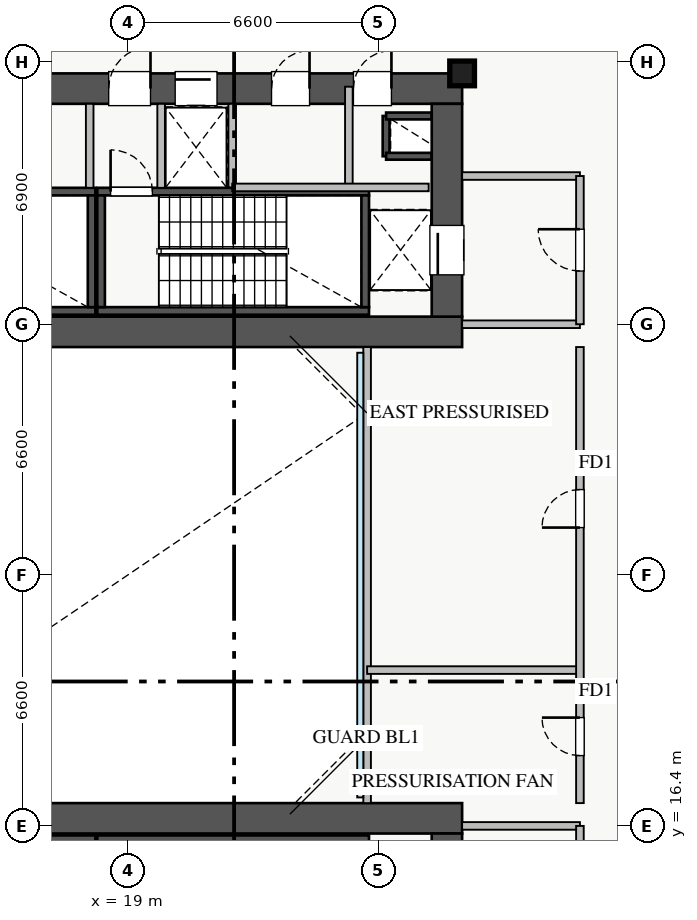
"""IFC4 building model, lengths in metres.
Left out: names, types, materials, properties, quantities, classifications, styles, units other than length and angle.
Written with IfcOpenShell. Run it as: python <this file> out.ifc"""

import sys

from ifc_helpers import new_model, si_unit, direction, frame, frame_2d, origin, origin_2d, place, context, subcontext, project, spatial, rectangle, extrude, source, transform, mapped, element, fill, save


model = new_model("IFC4")
c1 = context("Model", 3, precision=1e-05, world=origin(), true_north=direction((0.0, 1.0)))
c2 = subcontext(c1, "Body", "Model", "MODEL_VIEW")
j1 = project(units=[si_unit("LENGTHUNIT", "METRE"), si_unit("PLANEANGLEUNIT", "RADIAN")], contexts=[c1])
p1 = place(None, origin())
s1 = spatial("IfcSite", under=j1, at=p1, CompositionType="ELEMENT")
p2 = place(p1, origin())
s2 = spatial("IfcBuilding", under=s1, at=p2, CompositionType="ELEMENT")
p3 = place(p2, frame((0.0, 0.0, 45.75)))
s3 = spatial("IfcBuildingStorey", under=s2, at=p3, CompositionType="ELEMENT", Elevation=45.75)
p4 = place(p3, frame((25.8, 34.02, 0.0), z_axis=(0.0, 0.0, 1.0), x_axis=(0.0, 1.0, 0.0)))
e1 = element("IfcWall", 1, at=p4, inside=s3, PredefinedType="SHEAR", context=c2, shape_type="SweptSolid", body=[
    extrude(rectangle(XDim=1.06, YDim=0.18, at=frame_2d((0.53, 0.0))), origin(), (0.0, 0.0, 1.0), 4.32),
])
for number, where, z_axis, x_axis in (
    (2, (25.8, 35.08, 0.0), (0.0, 0.0, 1.0), (1.0, 0.0, 0.0)),
    (3, (25.8, 34.02, 0.0), (0.0, 0.0, 1.0), (1.0, 0.0, 0.0)),
):
    element("IfcWall", number, at=place(p3, frame(where, z_axis=z_axis, x_axis=x_axis)), inside=s3, PredefinedType="SHEAR", context=c2, shape_type="SweptSolid", body=[
        extrude(rectangle(XDim=1.2, YDim=0.18, at=frame_2d((0.6, 0.0))), origin(), (0.0, 0.0, 1.0), 4.32),
    ])
p5 = place(p3, frame((19.88, 33.2, 0.0), z_axis=(0.0, 0.0, 1.0), x_axis=(1.0, 0.0, 0.0)))
e4 = element("IfcWall", 4, at=p5, inside=s3, PredefinedType="SHEAR", context=c2, shape_type="SweptSolid", body=[
    extrude(rectangle(XDim=1.87, YDim=0.18, at=frame_2d((0.935, 0.0))), origin(), (0.0, 0.0, 1.0), 4.32),
])
p6 = place(p3, frame((11.0, 29.95, 0.0), z_axis=(0.0, 0.0, 1.0), x_axis=(1.0, 0.0, 0.0)))
e5 = element("IfcWall", 5, at=p6, inside=s3, PredefinedType="SHEAR", context=c2, shape_type="SweptSolid", body=[
    extrude(rectangle(XDim=7.15, YDim=0.2, at=frame_2d((3.575, 0.0))), origin(), (0.0, 0.0, 1.0), 4.5),
])
p7 = place(p3, frame((11.0, 33.09, 0.0), z_axis=(0.0, 0.0, 1.0), x_axis=(1.0, 0.0, 0.0)))
e6 = element("IfcWall", 6, at=p7, inside=s3, PredefinedType="SHEAR", context=c2, shape_type="SweptSolid", body=[
    extrude(rectangle(XDim=7.15, YDim=0.2, at=frame_2d((3.575, 0.0))), origin(), (0.0, 0.0, 1.0), 4.5),
])
p8 = place(p7, frame((0.35, 0.0, 0.0)))
e7 = element("IfcOpeningElement", 7, at=p8, cuts=e6, PredefinedType="OPENING", context=c2, shape_type="SweptSolid", body=[
    extrude(rectangle(XDim=1.1, YDim=2.05, at=frame_2d((0.55, 1.025))), frame((0.0, 0.11, 0.0), z_axis=(0.0, -1.0, 0.0), x_axis=(1.0, 0.0, 0.0)), (0.0, 0.0, 1.0), 0.22),
])
p9 = place(p3, frame((18.05, 30.05, 0.0), z_axis=(0.0, 0.0, 1.0), x_axis=(0.0, 1.0, 0.0)))
e8 = element("IfcWall", 8, at=p9, inside=s3, PredefinedType="SHEAR", context=c2, shape_type="SweptSolid", body=[
    extrude(rectangle(XDim=2.94, YDim=0.2, at=frame_2d((1.47, 0.0))), origin(), (0.0, 0.0, 1.0), 4.5),
])
p10 = place(p3, frame((18.2, 29.95, 0.0), z_axis=(0.0, 0.0, 1.0), x_axis=(1.0, 0.0, 0.0)))
e9 = element("IfcWall", 9, at=p10, inside=s3, PredefinedType="SHEAR", context=c2, shape_type="SweptSolid", body=[
    extrude(rectangle(XDim=7.15, YDim=0.2, at=frame_2d((3.575, 0.0))), origin(), (0.0, 0.0, 1.0), 4.5),
])
p11 = place(p3, frame((18.2, 33.09, 0.0), z_axis=(0.0, 0.0, 1.0), x_axis=(1.0, 0.0, 0.0)))
e10 = element("IfcWall", 10, at=p11, inside=s3, PredefinedType="SHEAR", context=c2, shape_type="SweptSolid", body=[
    extrude(rectangle(XDim=7.15, YDim=0.2, at=frame_2d((3.575, 0.0))), origin(), (0.0, 0.0, 1.0), 4.5),
])
p12 = place(p11, frame((0.35, 0.0, 0.0)))
e11 = element("IfcOpeningElement", 11, at=p12, cuts=e10, PredefinedType="OPENING", context=c2, shape_type="SweptSolid", body=[
    extrude(rectangle(XDim=1.1, YDim=2.05, at=frame_2d((0.55, 1.025))), frame((0.0, 0.11, 0.0), z_axis=(0.0, -1.0, 0.0), x_axis=(1.0, 0.0, 0.0)), (0.0, 0.0, 1.0), 0.22),
])
for number, where, z_axis, x_axis in (
    (12, (18.3, 30.05, 0.0), (0.0, 0.0, 1.0), (0.0, 1.0, 0.0)),
    (13, (25.25, 30.05, 0.0), (0.0, 0.0, 1.0), (0.0, 1.0, 0.0)),
):
    element("IfcWall", number, at=place(p3, frame(where, z_axis=z_axis, x_axis=x_axis)), inside=s3, PredefinedType="SHEAR", context=c2, shape_type="SweptSolid", body=[
        extrude(rectangle(XDim=2.94, YDim=0.2, at=frame_2d((1.47, 0.0))), origin(), (0.0, 0.0, 1.0), 4.5),
    ])
p13 = place(p3, frame((11.0, 16.05, 0.0), z_axis=(0.0, 0.0, 1.0), x_axis=(1.0, 0.0, 0.0)))
e14 = element("IfcWall", 14, at=p13, inside=s3, PredefinedType="SHEAR", context=c2, shape_type="SweptSolid", body=[
    extrude(rectangle(XDim=7.15, YDim=0.2, at=frame_2d((3.575, 0.0))), origin(), (0.0, 0.0, 1.0), 4.5),
])
p14 = place(p3, frame((18.2, 16.05, 0.0), z_axis=(0.0, 0.0, 1.0), x_axis=(1.0, 0.0, 0.0)))
e15 = element("IfcWall", 15, at=p14, inside=s3, PredefinedType="SHEAR", context=c2, shape_type="SweptSolid", body=[
    extrude(rectangle(XDim=7.15, YDim=0.2, at=frame_2d((3.575, 0.0))), origin(), (0.0, 0.0, 1.0), 4.5),
])
p15 = place(p3, frame((10.2, 29.4, 0.0), z_axis=(0.0, 0.0, 1.0), x_axis=(1.0, 0.0, 0.0)))
e16 = element("IfcWall", 16, at=p15, inside=s3, PredefinedType="SHEAR", context=c2, shape_type="SweptSolid", body=[
    extrude(rectangle(XDim=17.6, YDim=0.8, at=frame_2d((8.8, 0.0))), origin(), (0.0, 0.0, 1.0), 4.5),
])
p16 = place(p3, frame((10.2, 35.8, 0.0), z_axis=(0.0, 0.0, 1.0), x_axis=(1.0, 0.0, 0.0)))
e17 = element("IfcWall", 17, at=p16, inside=s3, PredefinedType="SHEAR", context=c2, shape_type="SweptSolid", body=[
    extrude(rectangle(XDim=17.6, YDim=0.8, at=frame_2d((8.8, 0.0))), origin(), (0.0, 0.0, 1.0), 4.5),
])
p17 = place(p16, frame((1.15, 0.0, 0.0)))
e18 = element("IfcOpeningElement", 18, at=p17, cuts=e17, PredefinedType="OPENING", context=c2, shape_type="SweptSolid", body=[
    extrude(rectangle(XDim=1.1, YDim=2.05, at=frame_2d((0.55, 1.025))), frame((0.0, 0.41, 0.0), z_axis=(0.0, -1.0, 0.0), x_axis=(1.0, 0.0, 0.0)), (0.0, 0.0, 1.0), 0.82),
])
p18 = place(p16, frame((8.3, 0.0, 0.0)))
e19 = element("IfcOpeningElement", 19, at=p18, cuts=e17, PredefinedType="OPENING", context=c2, shape_type="SweptSolid", body=[
    extrude(rectangle(XDim=1.1, YDim=2.05, at=frame_2d((0.55, 1.025))), frame((0.0, 0.41, 0.0), z_axis=(0.0, -1.0, 0.0), x_axis=(1.0, 0.0, 0.0)), (0.0, 0.0, 1.0), 0.82),
])
p19 = place(p16, frame((10.05, 0.0, 0.0)))
e20 = element("IfcOpeningElement", 20, at=p19, cuts=e17, PredefinedType="OPENING", context=c2, shape_type="SweptSolid", body=[
    extrude(rectangle(XDim=1.1, YDim=2.05, at=frame_2d((0.55, 1.025))), frame((0.0, 0.41, 0.0), z_axis=(0.0, -1.0, 0.0), x_axis=(1.0, 0.0, 0.0)), (0.0, 0.0, 1.0), 0.82),
])
p20 = place(p16, frame((4.9, 0.0, 0.0)))
e21 = element("IfcOpeningElement", 21, at=p20, cuts=e17, PredefinedType="OPENING", context=c2, shape_type="SweptSolid", body=[
    extrude(rectangle(XDim=1.1, YDim=2.05, at=frame_2d((0.55, 1.025))), frame((0.0, 0.41, 0.0), z_axis=(0.0, -1.0, 0.0), x_axis=(1.0, 0.0, 0.0)), (0.0, 0.0, 1.0), 0.82),
])
p21 = place(p16, frame((14.74, 0.0, 0.0)))
e22 = element("IfcOpeningElement", 22, at=p21, cuts=e17, PredefinedType="OPENING", context=c2, shape_type="SweptSolid", body=[
    extrude(rectangle(XDim=1.0, YDim=2.05, at=frame_2d((0.5, 1.025))), frame((0.0, 0.41, 0.0), z_axis=(0.0, -1.0, 0.0), x_axis=(1.0, 0.0, 0.0)), (0.0, 0.0, 1.0), 0.82),
])
p22 = place(p16, frame((12.585, 0.0, 0.0)))
e23 = element("IfcOpeningElement", 23, at=p22, cuts=e17, PredefinedType="OPENING", context=c2, shape_type="SweptSolid", body=[
    extrude(rectangle(XDim=1.0, YDim=2.05, at=frame_2d((0.5, 1.025))), frame((0.0, 0.41, 0.0), z_axis=(0.0, -1.0, 0.0), x_axis=(1.0, 0.0, 0.0)), (0.0, 0.0, 1.0), 0.82),
])
p23 = place(p3, frame((27.4, 29.8, 0.0), z_axis=(0.0, 0.0, 1.0), x_axis=(0.0, 1.0, 0.0)))
e24 = element("IfcWall", 24, at=p23, inside=s3, PredefinedType="SHEAR", context=c2, shape_type="SweptSolid", body=[
    extrude(rectangle(XDim=5.6, YDim=0.8, at=frame_2d((2.8, 0.0))), origin(), (0.0, 0.0, 1.0), 4.5),
])
p24 = place(p23, frame((1.1, 0.0, 0.0)))
e25 = element("IfcOpeningElement", 25, at=p24, cuts=e24, PredefinedType="OPENING", context=c2, shape_type="SweptSolid", body=[
    extrude(rectangle(XDim=1.3, YDim=2.05, at=frame_2d((0.65, 1.025))), frame((0.0, 0.41, 0.0), z_axis=(0.0, -1.0, 0.0), x_axis=(1.0, 0.0, 0.0)), (0.0, 0.0, 1.0), 0.82),
])
p25 = place(p3, frame((10.2, 16.6, 0.0), z_axis=(0.0, 0.0, 1.0), x_axis=(1.0, 0.0, 0.0)))
e26 = element("IfcWall", 26, at=p25, inside=s3, PredefinedType="SHEAR", context=c2, shape_type="SweptSolid", body=[
    extrude(rectangle(XDim=17.6, YDim=0.8, at=frame_2d((8.8, 0.0))), origin(), (0.0, 0.0, 1.0), 4.5),
])
p26 = place(p3, frame((27.4, 10.6, 0.0), z_axis=(0.0, 0.0, 1.0), x_axis=(0.0, 1.0, 0.0)))
e27 = element("IfcWall", 27, at=p26, inside=s3, PredefinedType="SHEAR", context=c2, shape_type="SweptSolid", body=[
    extrude(rectangle(XDim=5.6, YDim=0.8, at=frame_2d((2.8, 0.0))), origin(), (0.0, 0.0, 1.0), 4.5),
])
p27 = place(p26, frame((2.1, 0.0, 0.0)))
e28 = element("IfcOpeningElement", 28, at=p27, cuts=e27, PredefinedType="OPENING", context=c2, shape_type="SweptSolid", body=[
    extrude(rectangle(XDim=1.3, YDim=2.05, at=frame_2d((0.65, 1.025))), frame((0.0, 0.41, 0.0), z_axis=(0.0, -1.0, 0.0), x_axis=(1.0, 0.0, 0.0)), (0.0, 0.0, 1.0), 0.82),
])
m1 = source(origin(), c2, "Body", "SweptSolid", [
    extrude(rectangle(XDim=0.65, YDim=0.65, at=origin_2d()), origin(), (0.0, 0.0, 1.0), 4.5),
])
p28 = place(p3, frame((27.8, 36.2, 0.0), z_axis=(0.0, 0.0, 1.0), x_axis=(1.0, 0.0, 0.0)))
e29 = element("IfcColumn", 29, at=p28, inside=s3, PredefinedType="PILASTER", context=c2, shape_type="MappedRepresentation", body=[
    mapped(m1, transform((0.0, 0.0, 0.0), x_axis=(1.0, 0.0, 0.0), y_axis=(0.0, 1.0, 0.0), z_axis=(0.0, 0.0, 1.0), scale=1.0)),
])
p29 = place(p3, frame((27.8, 29.6, 0.0), z_axis=(0.0, 0.0, 1.0), x_axis=(1.0, 0.0, 0.0)))
e30 = element("IfcWall", 30, at=p29, inside=s3, PredefinedType="PARTITIONING", context=c2, shape_type="SweptSolid", body=[
    extrude(rectangle(XDim=3.1, YDim=0.2, at=frame_2d((1.55, 0.0))), origin(), (0.0, 0.0, 1.0), 4.32),
])
p30 = place(p3, frame((27.8, 33.5, 0.0), z_axis=(0.0, 0.0, 1.0), x_axis=(1.0, 0.0, 0.0)))
e31 = element("IfcWall", 31, at=p30, inside=s3, PredefinedType="PARTITIONING", context=c2, shape_type="SweptSolid", body=[
    extrude(rectangle(XDim=3.1, YDim=0.2, at=frame_2d((1.55, 0.0))), origin(), (0.0, 0.0, 1.0), 3.315),
])
p31 = place(p3, frame((30.9, 29.6, 0.0), z_axis=(0.0, 0.0, 1.0), x_axis=(0.0, 1.0, 0.0)))
e32 = element("IfcWall", 32, at=p31, inside=s3, PredefinedType="PARTITIONING", context=c2, shape_type="SweptSolid", body=[
    extrude(rectangle(XDim=3.9, YDim=0.2, at=frame_2d((1.95, 0.0))), origin(), (0.0, 0.0, 1.0), 4.32),
])
p32 = place(p31, frame((1.4, 0.0, 0.0)))
e33 = element("IfcOpeningElement", 33, at=p32, cuts=e32, PredefinedType="OPENING", context=c2, shape_type="SweptSolid", body=[
    extrude(rectangle(XDim=1.1, YDim=2.05, at=frame_2d((0.55, 1.025))), frame((0.0, 0.11, 0.0), z_axis=(0.0, -1.0, 0.0), x_axis=(1.0, 0.0, 0.0)), (0.0, 0.0, 1.0), 0.22),
])
p33 = place(p3, frame((27.8, 16.4, 0.0), z_axis=(0.0, 0.0, 1.0), x_axis=(1.0, 0.0, 0.0)))
e34 = element("IfcWall", 34, at=p33, inside=s3, PredefinedType="PARTITIONING", context=c2, shape_type="SweptSolid", body=[
    extrude(rectangle(XDim=3.1, YDim=0.2, at=frame_2d((1.55, 0.0))), origin(), (0.0, 0.0, 1.0), 4.32),
])
p34 = place(p3, frame((30.9, 12.5, 0.0), z_axis=(0.0, 0.0, 1.0), x_axis=(0.0, 1.0, 0.0)))
e35 = element("IfcWall", 35, at=p34, inside=s3, PredefinedType="PARTITIONING", context=c2, shape_type="SweptSolid", body=[
    extrude(rectangle(XDim=3.9, YDim=0.2, at=frame_2d((1.95, 0.0))), origin(), (0.0, 0.0, 1.0), 4.32),
])
p35 = place(p34, frame((1.4, 0.0, 0.0)))
e36 = element("IfcOpeningElement", 36, at=p35, cuts=e35, PredefinedType="OPENING", context=c2, shape_type="SweptSolid", body=[
    extrude(rectangle(XDim=1.1, YDim=2.05, at=frame_2d((0.55, 1.025))), frame((0.0, 0.11, 0.0), z_axis=(0.0, -1.0, 0.0), x_axis=(1.0, 0.0, 0.0)), (0.0, 0.0, 1.0), 0.22),
])
for number, where, z_axis, x_axis in (
    (37, (18.0, 33.19, 0.0), (0.0, 0.0, 1.0), (0.0, 1.0, 0.0)),
    (38, (19.88, 33.19, 0.0), (0.0, 0.0, 1.0), (0.0, 1.0, 0.0)),
):
    element("IfcWall", number, at=place(p3, frame(where, z_axis=z_axis, x_axis=x_axis)), inside=s3, PredefinedType="PARTITIONING", context=c2, shape_type="SweptSolid", body=[
        extrude(rectangle(XDim=2.21, YDim=0.2, at=frame_2d((1.105, 0.0))), origin(), (0.0, 0.0, 1.0), 4.32),
    ])
p36 = place(p3, frame((24.82, 33.2, 0.0), z_axis=(0.0, 0.0, 1.0), x_axis=(0.0, 1.0, 0.0)))
e39 = element("IfcWall", 39, at=p36, inside=s3, PredefinedType="PARTITIONING", context=c2, shape_type="SweptSolid", body=[
    extrude(rectangle(XDim=2.65, YDim=0.2, at=frame_2d((1.325, 0.0))), origin(), (0.0, 0.0, 1.0), 4.32),
])
p37 = place(p3, frame((21.75, 33.2, 0.0), z_axis=(0.0, 0.0, 1.0), x_axis=(0.0, 1.0, 0.0)))
e40 = element("IfcWall", 40, at=p37, inside=s3, PredefinedType="PARTITIONING", context=c2, shape_type="SweptSolid", body=[
    extrude(rectangle(XDim=2.2, YDim=0.2, at=frame_2d((1.1, 0.0))), origin(), (0.0, 0.0, 1.0), 4.32),
])
p38 = place(p3, frame((21.75, 33.2, 0.0), z_axis=(0.0, 0.0, 1.0), x_axis=(1.0, 0.0, 0.0)))
e41 = element("IfcWall", 41, at=p38, inside=s3, PredefinedType="PARTITIONING", context=c2, shape_type="SweptSolid", body=[
    extrude(rectangle(XDim=5.17, YDim=0.2, at=frame_2d((2.585, 0.0))), origin(), (0.0, 0.0, 1.0), 4.32),
])
p39 = place(p3, frame((25.3, 17.0, 0.0), z_axis=(0.0, 0.0, 1.0), x_axis=(0.0, 1.0, 0.0)))
e42 = element("IfcWall", 42, at=p39, inside=s3, PredefinedType="PARTITIONING", context=c2, shape_type="SweptSolid", body=[
    extrude(rectangle(XDim=12.0, YDim=0.2, at=frame_2d((6.0, 0.0))), origin(), (0.0, 0.0, 1.0), 3.815),
])
p40 = place(p3, frame((25.3, 20.5, 0.0), z_axis=(0.0, 0.0, 1.0), x_axis=(1.0, 0.0, 0.0)))
e43 = element("IfcWall", 43, at=p40, inside=s3, PredefinedType="PARTITIONING", context=c2, shape_type="SweptSolid", body=[
    extrude(rectangle(XDim=5.6, YDim=0.2, at=frame_2d((2.8, 0.0))), origin(), (0.0, 0.0, 1.0), 4.32),
])
p41 = place(p3, frame((30.9, 17.0, 0.0), z_axis=(0.0, 0.0, 1.0), x_axis=(0.0, 1.0, 0.0)))
e44 = element("IfcWall", 44, at=p41, inside=s3, PredefinedType="PARTITIONING", context=c2, shape_type="SweptSolid", body=[
    extrude(rectangle(XDim=12.0, YDim=0.2, at=frame_2d((6.0, 0.0))), origin(), (0.0, 0.0, 1.0), 4.32),
])
p42 = place(p41, frame((1.25, 0.0, 0.0)))
e45 = element("IfcOpeningElement", 45, at=p42, cuts=e44, PredefinedType="OPENING", context=c2, shape_type="SweptSolid", body=[
    extrude(rectangle(XDim=1.0, YDim=2.05, at=frame_2d((0.5, 1.025))), frame((0.0, 0.11, 0.0), z_axis=(0.0, -1.0, 0.0), x_axis=(1.0, 0.0, 0.0)), (0.0, 0.0, 1.0), 0.22),
])
p43 = place(p41, frame((7.25, 0.0, 0.0)))
e46 = element("IfcOpeningElement", 46, at=p43, cuts=e44, PredefinedType="OPENING", context=c2, shape_type="SweptSolid", body=[
    extrude(rectangle(XDim=1.0, YDim=2.05, at=frame_2d((0.5, 1.025))), frame((0.0, 0.11, 0.0), z_axis=(0.0, -1.0, 0.0), x_axis=(1.0, 0.0, 0.0)), (0.0, 0.0, 1.0), 0.22),
])
m2 = source(origin(), c2, "Body", "SweptSolid", [
    extrude(rectangle(XDim=1.3, YDim=2.05, at=frame_2d((0.65, 1.025))), frame((0.0, 0.025, 0.0), z_axis=(0.0, -1.0, 0.0), x_axis=(1.0, 0.0, 0.0)), (0.0, 0.0, 1.0), 0.05),
])
p44 = place(p24, origin())
e47 = element("IfcDoor", 47, at=p44, inside=s3, OperationType="SLIDING_TO_LEFT", PredefinedType="DOOR", context=c2, shape_type="MappedRepresentation", body=[
    mapped(m2, transform((0.0, 0.0, 0.0), x_axis=(1.0, 0.0, 0.0), y_axis=(0.0, 1.0, 0.0), z_axis=(0.0, 0.0, 1.0), scale=1.0)),
])
fill(e25, e47)
m3 = source(origin(), c2, "Body", "SweptSolid", [
    extrude(rectangle(XDim=1.1, YDim=2.05, at=frame_2d((0.55, 1.025))), frame((0.0, 0.025, 0.0), z_axis=(0.0, -1.0, 0.0), x_axis=(1.0, 0.0, 0.0)), (0.0, 0.0, 1.0), 0.05),
])
p45 = place(p18, origin())
e48 = element("IfcDoor", 48, at=p45, inside=s3, OperationType="SINGLE_SWING_RIGHT", PredefinedType="DOOR", context=c2, shape_type="MappedRepresentation", body=[
    mapped(m3, transform((0.0, 0.0, 0.0), x_axis=(1.0, 0.0, 0.0), y_axis=(0.0, 1.0, 0.0), z_axis=(0.0, 0.0, 1.0), scale=1.0)),
])
fill(e19, e48)
p46 = place(p12, origin())
e49 = element("IfcDoor", 49, at=p46, inside=s3, OperationType="SINGLE_SWING_LEFT", PredefinedType="DOOR", context=c2, shape_type="MappedRepresentation", body=[
    mapped(m3, transform((0.0, 0.0, 0.0), x_axis=(1.0, 0.0, 0.0), y_axis=(0.0, 1.0, 0.0), z_axis=(0.0, 0.0, 1.0), scale=1.0)),
])
fill(e11, e49)
p47 = place(p19, origin())
e50 = element("IfcDoor", 50, at=p47, inside=s3, OperationType="SLIDING_TO_LEFT", PredefinedType="DOOR", context=c2, shape_type="MappedRepresentation", body=[
    mapped(m3, transform((0.0, 0.0, 0.0), x_axis=(1.0, 0.0, 0.0), y_axis=(0.0, 1.0, 0.0), z_axis=(0.0, 0.0, 1.0), scale=1.0)),
])
fill(e20, e50)
m4 = source(origin(), c2, "Body", "SweptSolid", [
    extrude(rectangle(XDim=1.0, YDim=2.05, at=frame_2d((0.5, 1.025))), frame((0.0, 0.025, 0.0), z_axis=(0.0, -1.0, 0.0), x_axis=(1.0, 0.0, 0.0)), (0.0, 0.0, 1.0), 0.05),
])
p48 = place(p21, origin())
e51 = element("IfcDoor", 51, at=p48, inside=s3, OperationType="SINGLE_SWING_RIGHT", PredefinedType="DOOR", context=c2, shape_type="MappedRepresentation", body=[
    mapped(m4, transform((0.0, 0.0, 0.0), x_axis=(1.0, 0.0, 0.0), y_axis=(0.0, 1.0, 0.0), z_axis=(0.0, 0.0, 1.0), scale=1.0)),
])
fill(e22, e51)
p49 = place(p22, origin())
e52 = element("IfcDoor", 52, at=p49, inside=s3, OperationType="SINGLE_SWING_RIGHT", PredefinedType="DOOR", context=c2, shape_type="MappedRepresentation", body=[
    mapped(m4, transform((0.0, 0.0, 0.0), x_axis=(1.0, 0.0, 0.0), y_axis=(0.0, 1.0, 0.0), z_axis=(0.0, 0.0, 1.0), scale=1.0)),
])
fill(e23, e52)
p50 = place(p32, origin())
e53 = element("IfcDoor", 53, at=p50, inside=s3, OperationType="SINGLE_SWING_RIGHT", PredefinedType="DOOR", context=c2, shape_type="MappedRepresentation", body=[
    mapped(m3, transform((0.0, 0.0, 0.0), x_axis=(1.0, 0.0, 0.0), y_axis=(0.0, 1.0, 0.0), z_axis=(0.0, 0.0, 1.0), scale=1.0)),
])
fill(e33, e53)
p51 = place(p42, origin())
e54 = element("IfcDoor", 54, at=p51, inside=s3, OperationType="SINGLE_SWING_RIGHT", PredefinedType="DOOR", context=c2, shape_type="MappedRepresentation", body=[
    mapped(m4, transform((0.0, 0.0, 0.0), x_axis=(1.0, 0.0, 0.0), y_axis=(0.0, 1.0, 0.0), z_axis=(0.0, 0.0, 1.0), scale=1.0)),
])
fill(e45, e54)
p52 = place(p43, origin())
e55 = element("IfcDoor", 55, at=p52, inside=s3, OperationType="SINGLE_SWING_LEFT", PredefinedType="DOOR", context=c2, shape_type="MappedRepresentation", body=[
    mapped(m4, transform((0.0, 0.0, 0.0), x_axis=(1.0, 0.0, 0.0), y_axis=(0.0, 1.0, 0.0), z_axis=(0.0, 0.0, 1.0), scale=1.0)),
])
fill(e46, e55)
save(model, sys.argv[1])
